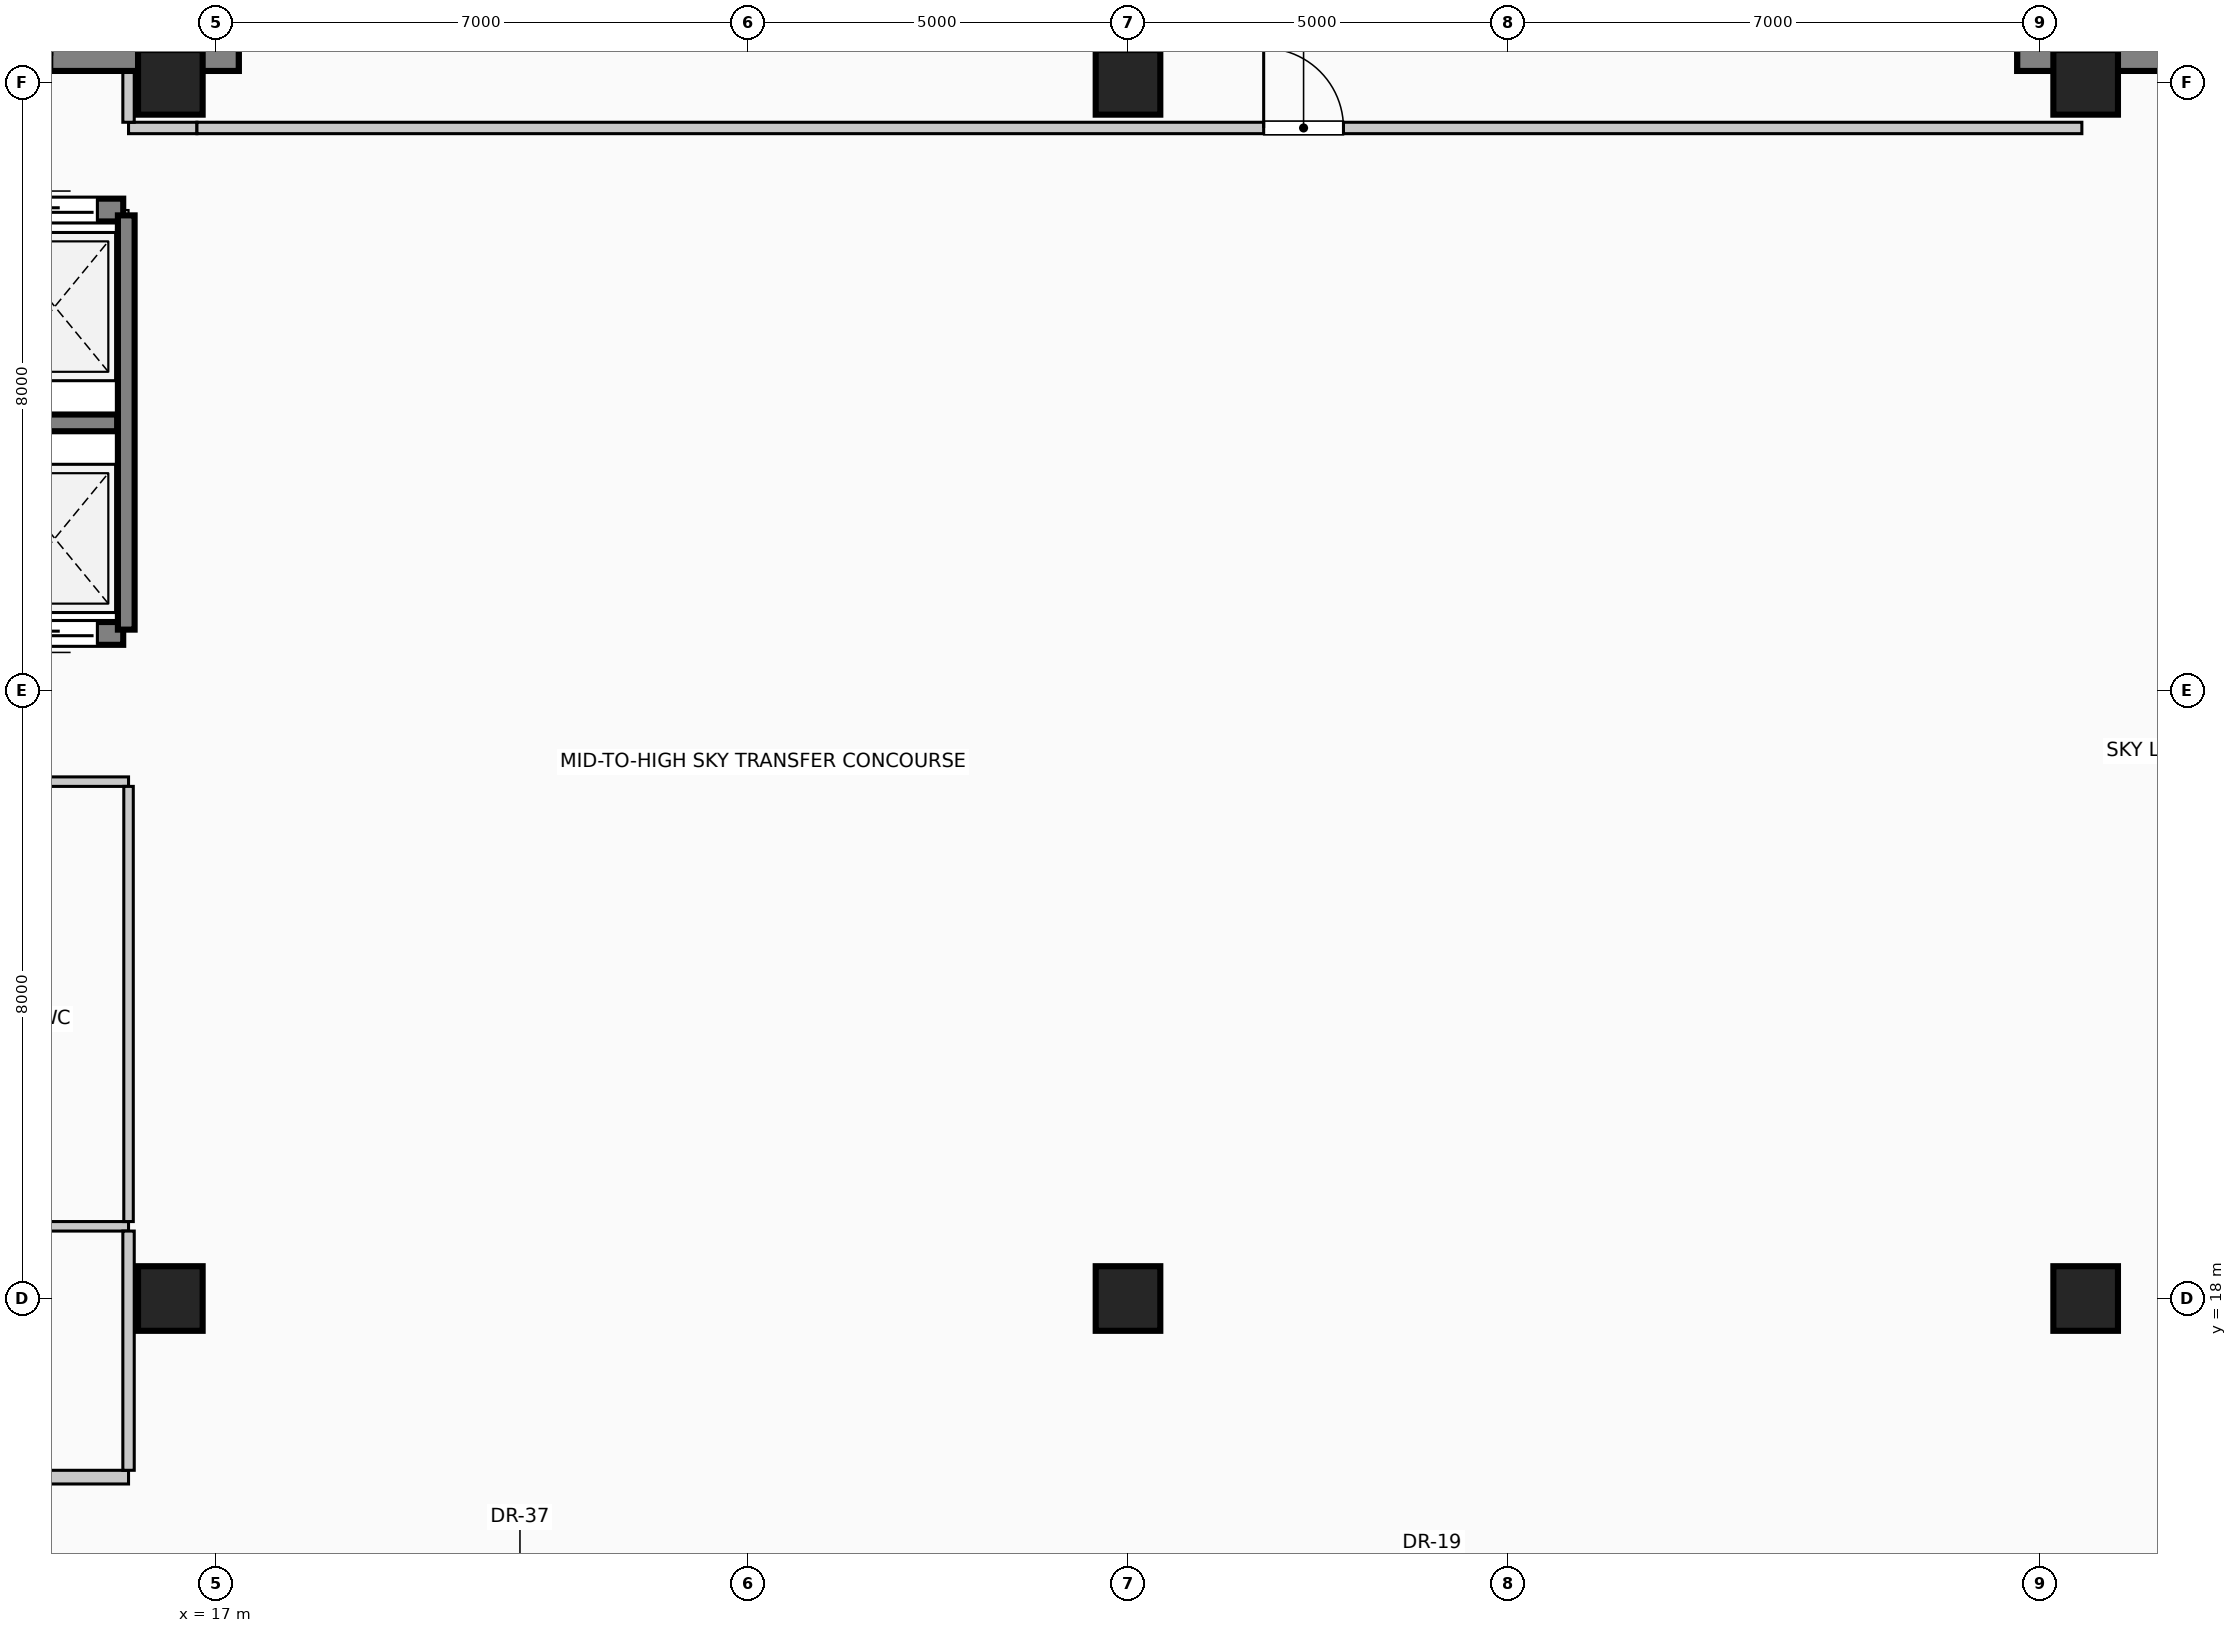
"""IFC4 building model, lengths in metres.
Left out: names, types, materials, properties, quantities, classifications, styles, units other than length and angle.
Written with IfcOpenShell. Run it as: python <this file> out.ifc"""

import sys

from ifc_helpers import new_model, si_unit, direction, frame, frame_2d, origin, origin_2d, place, context, subcontext, project, spatial, rectangle, circle, extrude, element, fill, save


model = new_model("IFC4")
c1 = context("Model", 3, precision=1e-05, world=origin(), true_north=direction((0.0, 1.0)))
c2 = subcontext(c1, "Body", "Model", "MODEL_VIEW")
j1 = project(units=[si_unit("LENGTHUNIT", "METRE"), si_unit("PLANEANGLEUNIT", "RADIAN")], contexts=[c1])
p1 = place(None, origin())
s1 = spatial("IfcSite", under=j1, at=p1, CompositionType="ELEMENT")
p2 = place(p1, origin())
s2 = spatial("IfcBuilding", under=s1, at=p2, CompositionType="ELEMENT")
p3 = place(p2, frame((0.0, 0.0, 165.8)))
s3 = spatial("IfcBuildingStorey", under=s2, at=p3, CompositionType="ELEMENT", Elevation=165.8)
p4 = place(p3, frame((16.875, 34.15, 0.0), z_axis=(0.0, 0.0, 1.0), x_axis=(0.0, 1.0, 0.0)))
e1 = element("IfcWall", 1, at=p4, inside=s3, PredefinedType="SHEAR", context=c2, shape_type="SweptSolid", body=[
    extrude(rectangle(XDim=9.13, YDim=0.85, at=frame_2d((4.565, 0.0))), origin(), (0.0, 0.0, 1.0), 4.8),
])
p5 = place(p3, frame((12.29, 34.35, 0.0), z_axis=(0.0, 0.0, 1.0), x_axis=(1.0, 0.0, 0.0)))
e2 = element("IfcWall", 2, at=p5, inside=s3, PredefinedType="SHEAR", context=c2, shape_type="SweptSolid", body=[
    extrude(rectangle(XDim=5.01, YDim=0.4, at=frame_2d((2.505, 0.0))), origin(), (0.0, 0.0, 1.0), 4.8),
])
p6 = place(p5, frame((1.4, 0.0, 0.0)))
e3 = element("IfcOpeningElement", 3, at=p6, cuts=e2, PredefinedType="OPENING", context=c2, shape_type="SweptSolid", body=[
    extrude(rectangle(XDim=1.15, YDim=2.2, at=frame_2d((0.575, 1.1))), frame((0.0, 0.21, 0.0), z_axis=(0.0, -1.0, 0.0), x_axis=(1.0, 0.0, 0.0)), (0.0, 0.0, 1.0), 0.42),
])
p7 = place(p3, frame((41.125, 34.15, 0.0), z_axis=(0.0, 0.0, 1.0), x_axis=(0.0, 1.0, 0.0)))
e4 = element("IfcWall", 4, at=p7, inside=s3, PredefinedType="SHEAR", context=c2, shape_type="SweptSolid", body=[
    extrude(rectangle(XDim=9.13, YDim=0.85, at=frame_2d((4.565, 0.0))), origin(), (0.0, 0.0, 1.0), 4.8),
])
p8 = place(p3, frame((40.7, 34.35, 0.0), z_axis=(0.0, 0.0, 1.0), x_axis=(1.0, 0.0, 0.0)))
e5 = element("IfcWall", 5, at=p8, inside=s3, PredefinedType="SHEAR", context=c2, shape_type="SweptSolid", body=[
    extrude(rectangle(XDim=5.01, YDim=0.4, at=frame_2d((2.505, 0.0))), origin(), (0.0, 0.0, 1.0), 4.8),
])
p9 = place(p8, frame((2.4, 0.0, 0.0)))
e6 = element("IfcOpeningElement", 6, at=p9, cuts=e5, PredefinedType="OPENING", context=c2, shape_type="SweptSolid", body=[
    extrude(rectangle(XDim=1.15, YDim=2.2, at=frame_2d((0.575, 1.1))), frame((0.0, 0.21, 0.0), z_axis=(0.0, -1.0, 0.0), x_axis=(1.0, 0.0, 0.0)), (0.0, 0.0, 1.0), 0.42),
])
for number, where, z_axis, x_axis in (
    (7, (16.4, 18.0, 0.0), (0.0, 0.0, 1.0), (1.0, 0.0, 0.0)),
    (8, (16.4, 34.0, 0.0), (0.0, 0.0, 1.0), (1.0, 0.0, 0.0)),
    (9, (29.0, 18.0, 0.0), (0.0, 0.0, 1.0), (1.0, 0.0, 0.0)),
    (10, (29.0, 34.0, 0.0), (0.0, 0.0, 1.0), (1.0, 0.0, 0.0)),
    (11, (41.6, 18.0, 0.0), (0.0, 0.0, 1.0), (1.0, 0.0, 0.0)),
    (12, (41.6, 34.0, 0.0), (0.0, 0.0, 1.0), (1.0, 0.0, 0.0)),
):
    element("IfcColumn", number, at=place(p3, frame(where, z_axis=z_axis, x_axis=x_axis)), inside=s3, PredefinedType="COLUMN", context=c2, shape_type="SweptSolid", body=[
        extrude(circle(Radius=0.425, at=origin_2d()), origin(), (0.0, 0.0, 1.0), 4.8),
    ])
p10 = place(p3, frame((15.78, 26.75, 0.0), z_axis=(0.0, 0.0, 1.0), x_axis=(-1.0, 0.0, 0.0)))
e13 = element("IfcWall", 13, at=p10, inside=s3, PredefinedType="SOLIDWALL", context=c2, shape_type="SweptSolid", body=[
    extrude(rectangle(XDim=1.78, YDim=0.3, at=frame_2d((0.89, 0.0))), origin(), (0.0, 0.0, 1.0), 4.8),
])
p11 = place(p10, frame((0.34, 0.0, 0.0)))
e14 = element("IfcOpeningElement", 14, at=p11, cuts=e13, PredefinedType="OPENING", context=c2, shape_type="SweptSolid", body=[
    extrude(rectangle(XDim=1.1, YDim=2.2, at=frame_2d((0.55, 1.1))), frame((0.0, 0.16, 0.0), z_axis=(0.0, -1.0, 0.0), x_axis=(1.0, 0.0, 0.0)), (0.0, 0.0, 1.0), 0.32),
])
p12 = place(p3, frame((14.0, 32.32, 0.0), z_axis=(0.0, 0.0, 1.0), x_axis=(1.0, 0.0, 0.0)))
e15 = element("IfcWall", 15, at=p12, inside=s3, PredefinedType="SOLIDWALL", context=c2, shape_type="SweptSolid", body=[
    extrude(rectangle(XDim=1.78, YDim=0.3, at=frame_2d((0.89, 0.0))), origin(), (0.0, 0.0, 1.0), 4.8),
])
p13 = place(p12, frame((0.34, 0.0, 0.0)))
e16 = element("IfcOpeningElement", 16, at=p13, cuts=e15, PredefinedType="OPENING", context=c2, shape_type="SweptSolid", body=[
    extrude(rectangle(XDim=1.1, YDim=2.2, at=frame_2d((0.55, 1.1))), frame((0.0, 0.16, 0.0), z_axis=(0.0, -1.0, 0.0), x_axis=(1.0, 0.0, 0.0)), (0.0, 0.0, 1.0), 0.32),
])
p14 = place(p3, frame((15.82, 26.8, 0.0), z_axis=(0.0, 0.0, 1.0), x_axis=(0.0, 1.0, 0.0)))
e17 = element("IfcWall", 17, at=p14, inside=s3, PredefinedType="SOLIDWALL", context=c2, shape_type="SweptSolid", body=[
    extrude(rectangle(XDim=5.45, YDim=0.22, at=frame_2d((2.725, 0.0))), origin(), (0.0, 0.0, 1.0), 4.8),
])
p15 = place(p3, frame((12.3, 29.52, 0.0), z_axis=(0.0, 0.0, 1.0), x_axis=(1.0, 0.0, 0.0)))
e18 = element("IfcWall", 18, at=p15, inside=s3, PredefinedType="SOLIDWALL", context=c2, shape_type="SweptSolid", body=[
    extrude(rectangle(XDim=3.4, YDim=0.22, at=frame_2d((1.7, 0.0))), origin(), (0.0, 0.0, 1.0), 4.8),
])
p16 = place(p3, frame((3.55, 15.65, 0.0), z_axis=(0.0, 0.0, 1.0), x_axis=(1.0, 0.0, 0.0)))
e19 = element("IfcWall", 19, at=p16, inside=s3, PredefinedType="PARTITIONING", context=c2, shape_type="SweptSolid", body=[
    extrude(rectangle(XDim=12.3, YDim=0.18, at=frame_2d((6.15, 0.0))), origin(), (0.0, 0.0, 1.0), 4.525),
])
p17 = place(p16, frame((5.675, 0.0, 0.0)))
e20 = element("IfcOpeningElement", 20, at=p17, cuts=e19, PredefinedType="OPENING", context=c2, shape_type="SweptSolid", body=[
    extrude(rectangle(XDim=0.95, YDim=2.15, at=frame_2d((0.475, 1.075))), frame((0.0, 0.1, 0.0), z_axis=(0.0, -1.0, 0.0), x_axis=(1.0, 0.0, 0.0)), (0.0, 0.0, 1.0), 0.2),
])
p18 = place(p3, frame((9.8, 18.95, 0.0), z_axis=(0.0, 0.0, 1.0), x_axis=(1.0, 0.0, 0.0)))
e21 = element("IfcWall", 21, at=p18, inside=s3, PredefinedType="PARTITIONING", context=c2, shape_type="SweptSolid", body=[
    extrude(rectangle(XDim=6.05, YDim=0.125, at=frame_2d((3.025, 0.0))), origin(), (0.0, 0.0, 1.0), 4.525),
])
p19 = place(p3, frame((9.8, 24.8, 0.0), z_axis=(0.0, 0.0, 1.0), x_axis=(1.0, 0.0, 0.0)))
e22 = element("IfcWall", 22, at=p19, inside=s3, PredefinedType="PARTITIONING", context=c2, shape_type="SweptSolid", body=[
    extrude(rectangle(XDim=6.05, YDim=0.125, at=frame_2d((3.025, 0.0))), origin(), (0.0, 0.0, 1.0), 4.525),
])
p20 = place(p19, frame((2.575, 0.0, 0.0)))
e23 = element("IfcOpeningElement", 23, at=p20, cuts=e22, PredefinedType="OPENING", context=c2, shape_type="SweptSolid", body=[
    extrude(rectangle(XDim=0.9, YDim=2.1, at=frame_2d((0.45, 1.05))), frame((0.0, 0.073, 0.0), z_axis=(0.0, -1.0, 0.0), x_axis=(1.0, 0.0, 0.0)), (0.0, 0.0, 1.0), 0.145),
])
p21 = place(p3, frame((15.85, 33.4, 0.0), z_axis=(0.0, 0.0, 1.0), x_axis=(1.0, 0.0, 0.0)))
e24 = element("IfcWall", 24, at=p21, inside=s3, PredefinedType="PARTITIONING", context=c2, shape_type="SweptSolid", body=[
    extrude(rectangle(XDim=0.9, YDim=0.15, at=frame_2d((0.45, 0.0))), origin(), (0.0, 0.0, 1.0), 4.525),
])
p22 = place(p3, frame((16.75, 33.4, 0.0), z_axis=(0.0, 0.0, 1.0), x_axis=(1.0, 0.0, 0.0)))
e25 = element("IfcWall", 25, at=p22, inside=s3, PredefinedType="PARTITIONING", context=c2, shape_type="SweptSolid", body=[
    extrude(rectangle(XDim=24.8, YDim=0.15, at=frame_2d((12.4, 0.0))), origin(), (0.0, 0.0, 1.0), 4.525),
])
p23 = place(p22, frame((14.035, 0.0, 0.0)))
e26 = element("IfcOpeningElement", 26, at=p23, cuts=e25, PredefinedType="OPENING", context=c2, shape_type="SweptSolid", body=[
    extrude(rectangle(XDim=1.05, YDim=2.15, at=frame_2d((0.525, 1.075))), frame((0.0, 0.085, 0.0), z_axis=(0.0, -1.0, 0.0), x_axis=(1.0, 0.0, 0.0)), (0.0, 0.0, 1.0), 0.17),
])
p24 = place(p3, frame((15.85, 15.74, 0.0), z_axis=(0.0, 0.0, 1.0), x_axis=(0.0, 1.0, 0.0)))
e27 = element("IfcWall", 27, at=p24, inside=s3, PredefinedType="PARTITIONING", context=c2, shape_type="SweptSolid", body=[
    extrude(rectangle(XDim=3.147, YDim=0.15, at=frame_2d((1.574, 0.0))), origin(), (0.0, 0.0, 1.0), 4.525),
])
p25 = place(p3, frame((15.85, 19.012, 0.0), z_axis=(0.0, 0.0, 1.0), x_axis=(0.0, 1.0, 0.0)))
e28 = element("IfcWall", 28, at=p25, inside=s3, PredefinedType="PARTITIONING", context=c2, shape_type="SweptSolid", body=[
    extrude(rectangle(XDim=5.725, YDim=0.125, at=frame_2d((2.863, 0.0))), origin(), (0.0, 0.0, 1.0), 4.525),
])
p26 = place(p3, frame((15.85, 33.475, 0.0), z_axis=(0.0, 0.0, 1.0), x_axis=(0.0, 1.0, 0.0)))
e29 = element("IfcWall", 29, at=p26, inside=s3, PredefinedType="PARTITIONING", context=c2, shape_type="SweptSolid", body=[
    extrude(rectangle(XDim=0.675, YDim=0.15, at=frame_2d((0.337, 0.0))), origin(), (0.0, 0.0, 1.0), 4.525),
])
p27 = place(p11, origin())
e30 = element("IfcDoor", 30, at=p27, inside=s3, OperationType="SLIDING_TO_RIGHT", PredefinedType="DOOR", context=c2, shape_type="SweptSolid", body=[
    extrude(rectangle(XDim=1.1, YDim=2.2, at=frame_2d((0.55, 1.1))), frame((0.0, 0.025, 0.0), z_axis=(0.0, -1.0, 0.0), x_axis=(1.0, 0.0, 0.0)), (0.0, 0.0, 1.0), 0.05),
])
fill(e14, e30)
p28 = place(p13, origin())
e31 = element("IfcDoor", 31, at=p28, inside=s3, OperationType="SLIDING_TO_RIGHT", PredefinedType="DOOR", context=c2, shape_type="SweptSolid", body=[
    extrude(rectangle(XDim=1.1, YDim=2.2, at=frame_2d((0.55, 1.1))), frame((0.0, 0.025, 0.0), z_axis=(0.0, -1.0, 0.0), x_axis=(1.0, 0.0, 0.0)), (0.0, 0.0, 1.0), 0.05),
])
fill(e16, e31)
p29 = place(p23, origin())
e32 = element("IfcDoor", 32, at=p29, inside=s3, OperationType="SINGLE_SWING_LEFT", PredefinedType="DOOR", context=c2, shape_type="SweptSolid", body=[
    extrude(rectangle(XDim=1.05, YDim=2.15, at=frame_2d((0.525, 1.075))), frame((0.0, 0.025, 0.0), z_axis=(0.0, -1.0, 0.0), x_axis=(1.0, 0.0, 0.0)), (0.0, 0.0, 1.0), 0.05),
])
fill(e26, e32)
save(model, sys.argv[1])
